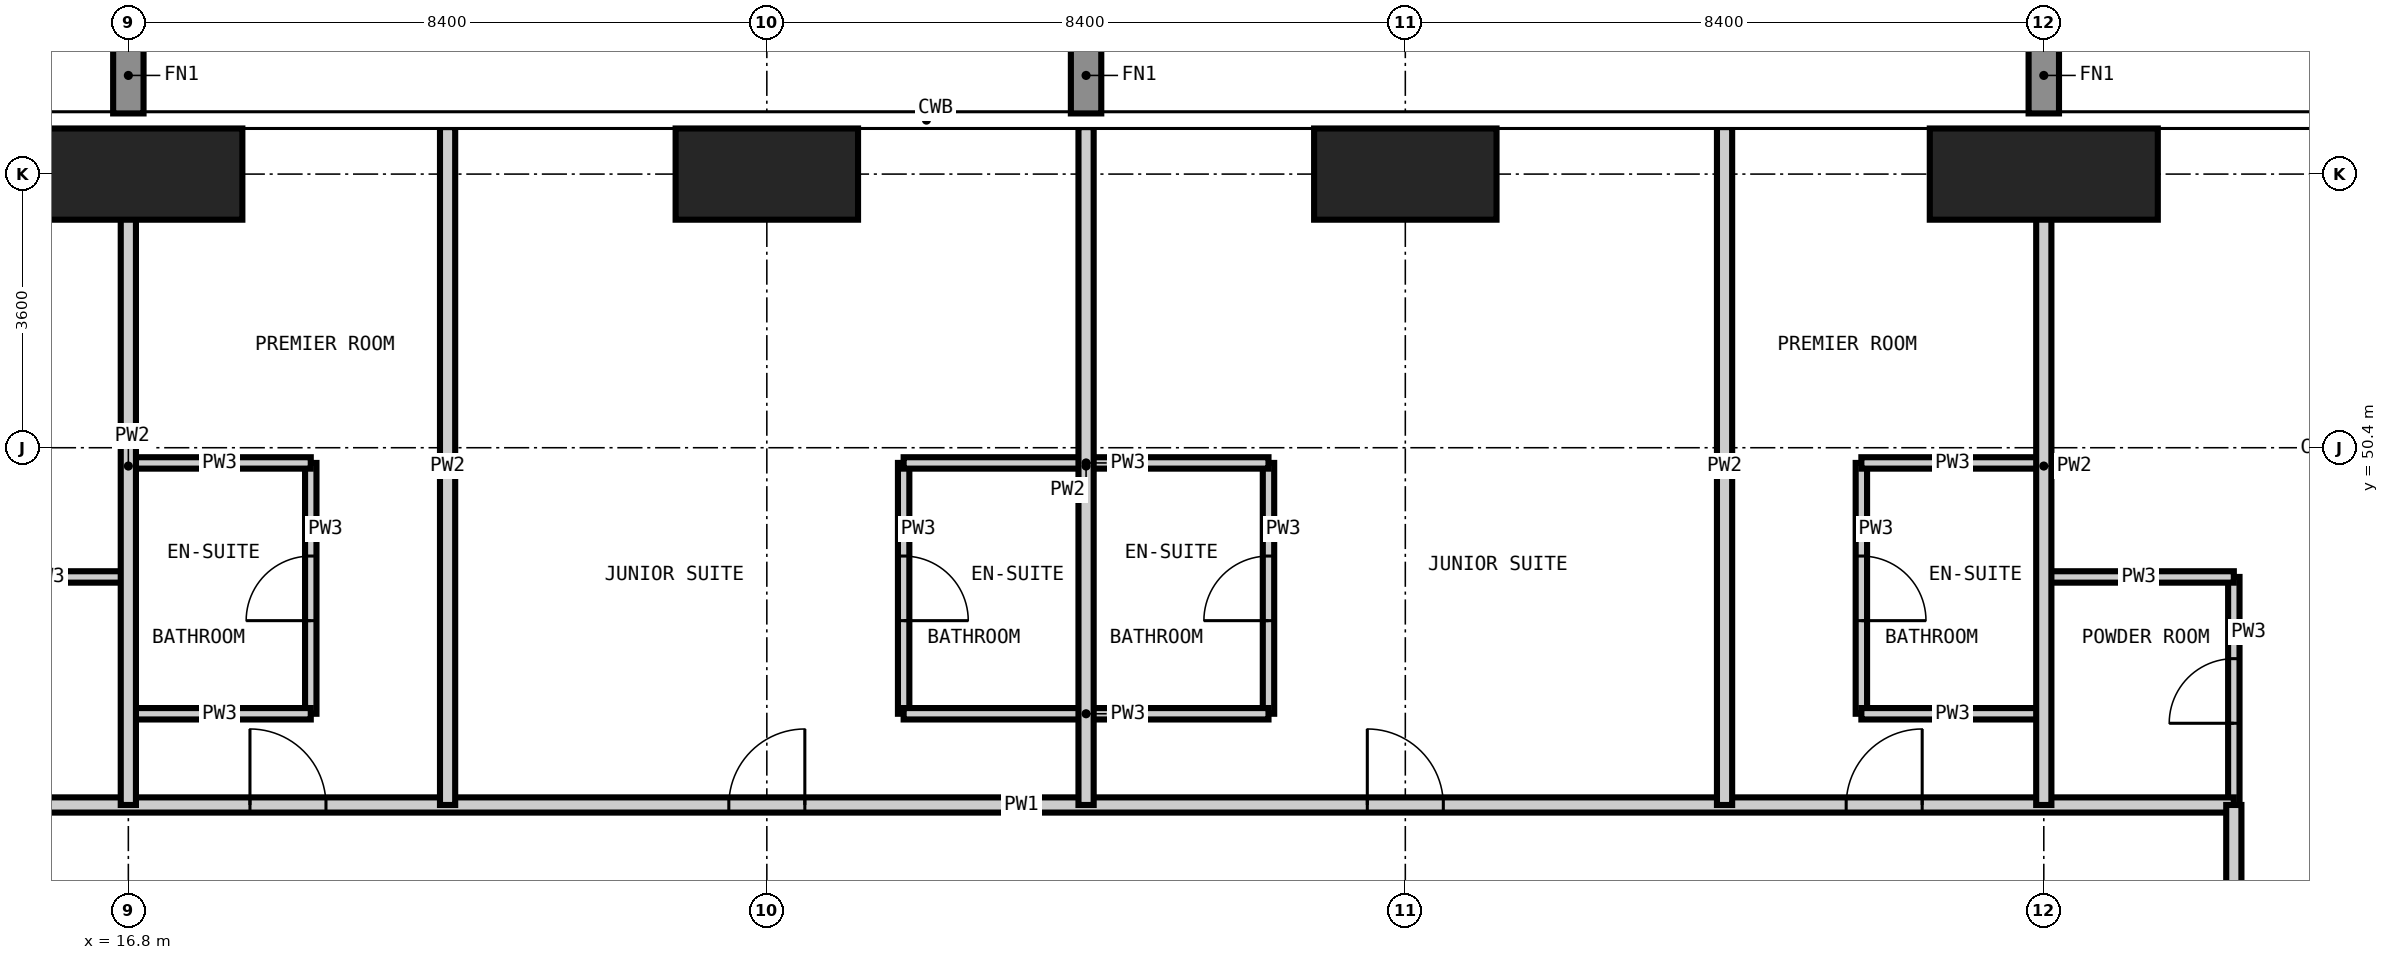
"""IFC4 building model, lengths in metres.
Left out: names, types, materials, properties, quantities, classifications, styles, units other than length and angle.
Written with IfcOpenShell. Run it as: python <this file> out.ifc"""

import sys

from ifc_helpers import new_model, si_unit, direction, frame, frame_2d, origin, origin_2d, place, context, subcontext, project, spatial, rectangle, extrude, element, fill, save


model = new_model("IFC4")
c1 = context("Model", 3, precision=1e-05, world=origin(), true_north=direction((0.0, 1.0)))
c2 = subcontext(c1, "Body", "Model", "MODEL_VIEW")
j1 = project(units=[si_unit("LENGTHUNIT", "METRE"), si_unit("PLANEANGLEUNIT", "RADIAN")], contexts=[c1])
p1 = place(None, origin())
s1 = spatial("IfcSite", under=j1, at=p1, CompositionType="ELEMENT")
p2 = place(p1, origin())
s2 = spatial("IfcBuilding", under=s1, at=p2, CompositionType="ELEMENT")
p3 = place(p2, frame((0.0, 0.0, 97.2)))
s3 = spatial("IfcBuildingStorey", under=s2, at=p3, CompositionType="ELEMENT", Elevation=97.2)
p4 = place(p3, frame((16.8, 54.0, -0.35), z_axis=(0.0, 0.0, 1.0), x_axis=(1.0, 0.0, 0.0)))
e1 = element("IfcColumn", 1, at=p4, inside=s3, PredefinedType="COLUMN", context=c2, shape_type="SweptSolid", body=[
    extrude(rectangle(XDim=3.0, YDim=1.2, at=origin_2d()), origin(), (0.0, 0.0, 1.0), 3.6),
])
for number, where, z_axis, x_axis in (
    (2, (25.2, 54.0, -0.35), (0.0, 0.0, 1.0), (1.0, 0.0, 0.0)),
    (3, (33.6, 54.0, -0.35), (0.0, 0.0, 1.0), (1.0, 0.0, 0.0)),
):
    element("IfcColumn", number, at=place(p3, frame(where, z_axis=z_axis, x_axis=x_axis)), inside=s3, PredefinedType="COLUMN", context=c2, shape_type="SweptSolid", body=[
        extrude(rectangle(XDim=2.4, YDim=1.2, at=origin_2d()), origin(), (0.0, 0.0, 1.0), 3.6),
    ])
p5 = place(p3, frame((42.0, 54.0, -0.35), z_axis=(0.0, 0.0, 1.0), x_axis=(1.0, 0.0, 0.0)))
e4 = element("IfcColumn", 4, at=p5, inside=s3, PredefinedType="COLUMN", context=c2, shape_type="SweptSolid", body=[
    extrude(rectangle(XDim=3.0, YDim=1.2, at=origin_2d()), origin(), (0.0, 0.0, 1.0), 3.6),
])
p6 = place(p3, frame((19.2, 46.9, 0.0), z_axis=(0.0, 0.0, 1.0), x_axis=(0.0, 1.0, 0.0)))
e5 = element("IfcWall", 5, at=p6, inside=s3, PredefinedType="PARTITIONING", context=c2, shape_type="SweptSolid", body=[
    extrude(rectangle(XDim=3.3, YDim=0.15, at=frame_2d((1.65, 0.0))), origin(), (0.0, 0.0, 1.0), 3.25),
])
p7 = place(p6, frame((1.225, 0.0, 0.0)))
e6 = element("IfcOpeningElement", 6, at=p7, cuts=e5, PredefinedType="OPENING", context=c2, shape_type="SweptSolid", body=[
    extrude(rectangle(XDim=0.85, YDim=2.1, at=frame_2d((0.425, 1.05))), frame((0.0, 0.085, 0.0), z_axis=(0.0, -1.0, 0.0), x_axis=(1.0, 0.0, 0.0)), (0.0, 0.0, 1.0), 0.17),
])
p8 = place(p3, frame((27.0, 46.9, 0.0), z_axis=(0.0, 0.0, 1.0), x_axis=(0.0, 1.0, 0.0)))
e7 = element("IfcWall", 7, at=p8, inside=s3, PredefinedType="PARTITIONING", context=c2, shape_type="SweptSolid", body=[
    extrude(rectangle(XDim=3.3, YDim=0.15, at=frame_2d((1.65, 0.0))), origin(), (0.0, 0.0, 1.0), 3.25),
])
p9 = place(p8, frame((1.225, 0.0, 0.0)))
e8 = element("IfcOpeningElement", 8, at=p9, cuts=e7, PredefinedType="OPENING", context=c2, shape_type="SweptSolid", body=[
    extrude(rectangle(XDim=0.85, YDim=2.1, at=frame_2d((0.425, 1.05))), frame((0.0, 0.085, 0.0), z_axis=(0.0, -1.0, 0.0), x_axis=(1.0, 0.0, 0.0)), (0.0, 0.0, 1.0), 0.17),
])
p10 = place(p3, frame((31.8, 46.9, 0.0), z_axis=(0.0, 0.0, 1.0), x_axis=(0.0, 1.0, 0.0)))
e9 = element("IfcWall", 9, at=p10, inside=s3, PredefinedType="PARTITIONING", context=c2, shape_type="SweptSolid", body=[
    extrude(rectangle(XDim=3.3, YDim=0.15, at=frame_2d((1.65, 0.0))), origin(), (0.0, 0.0, 1.0), 3.25),
])
p11 = place(p10, frame((1.225, 0.0, 0.0)))
e10 = element("IfcOpeningElement", 10, at=p11, cuts=e9, PredefinedType="OPENING", context=c2, shape_type="SweptSolid", body=[
    extrude(rectangle(XDim=0.85, YDim=2.1, at=frame_2d((0.425, 1.05))), frame((0.0, 0.085, 0.0), z_axis=(0.0, -1.0, 0.0), x_axis=(1.0, 0.0, 0.0)), (0.0, 0.0, 1.0), 0.17),
])
p12 = place(p3, frame((39.6, 46.9, 0.0), z_axis=(0.0, 0.0, 1.0), x_axis=(0.0, 1.0, 0.0)))
e11 = element("IfcWall", 11, at=p12, inside=s3, PredefinedType="PARTITIONING", context=c2, shape_type="SweptSolid", body=[
    extrude(rectangle(XDim=3.3, YDim=0.15, at=frame_2d((1.65, 0.0))), origin(), (0.0, 0.0, 1.0), 3.25),
])
p13 = place(p12, frame((1.225, 0.0, 0.0)))
e12 = element("IfcOpeningElement", 12, at=p13, cuts=e11, PredefinedType="OPENING", context=c2, shape_type="SweptSolid", body=[
    extrude(rectangle(XDim=0.85, YDim=2.1, at=frame_2d((0.425, 1.05))), frame((0.0, 0.085, 0.0), z_axis=(0.0, -1.0, 0.0), x_axis=(1.0, 0.0, 0.0)), (0.0, 0.0, 1.0), 0.17),
])
p14 = place(p3, frame((44.5, 45.7, 0.0), z_axis=(0.0, 0.0, 1.0), x_axis=(0.0, 1.0, 0.0)))
e13 = element("IfcWall", 13, at=p14, inside=s3, PredefinedType="PARTITIONING", context=c2, shape_type="SweptSolid", body=[
    extrude(rectangle(XDim=3.0, YDim=0.15, at=frame_2d((1.5, 0.0))), origin(), (0.0, 0.0, 1.0), 3.25),
])
p15 = place(p14, frame((1.075, 0.0, 0.0)))
e14 = element("IfcOpeningElement", 14, at=p15, cuts=e13, PredefinedType="OPENING", context=c2, shape_type="SweptSolid", body=[
    extrude(rectangle(XDim=0.85, YDim=2.1, at=frame_2d((0.425, 1.05))), frame((0.0, 0.085, 0.0), z_axis=(0.0, -1.0, 0.0), x_axis=(1.0, 0.0, 0.0)), (0.0, 0.0, 1.0), 0.17),
])
p16 = place(p3, frame((16.8, 46.9, 0.0), z_axis=(0.0, 0.0, 1.0), x_axis=(1.0, 0.0, 0.0)))
e15 = element("IfcWall", 15, at=p16, inside=s3, PredefinedType="PARTITIONING", context=c2, shape_type="SweptSolid", body=[
    extrude(rectangle(XDim=2.4, YDim=0.15, at=frame_2d((1.2, 0.0))), origin(), (0.0, 0.0, 1.0), 3.25),
])
p17 = place(p3, frame((27.0, 46.9, 0.0), z_axis=(0.0, 0.0, 1.0), x_axis=(1.0, 0.0, 0.0)))
e16 = element("IfcWall", 16, at=p17, inside=s3, PredefinedType="PARTITIONING", context=c2, shape_type="SweptSolid", body=[
    extrude(rectangle(XDim=4.8, YDim=0.15, at=frame_2d((2.4, 0.0))), origin(), (0.0, 0.0, 1.0), 3.25),
])
p18 = place(p3, frame((39.6, 46.9, 0.0), z_axis=(0.0, 0.0, 1.0), x_axis=(1.0, 0.0, 0.0)))
e17 = element("IfcWall", 17, at=p18, inside=s3, PredefinedType="PARTITIONING", context=c2, shape_type="SweptSolid", body=[
    extrude(rectangle(XDim=2.4, YDim=0.15, at=frame_2d((1.2, 0.0))), origin(), (0.0, 0.0, 1.0), 3.25),
])
p19 = place(p3, frame((12.6, 48.7, 0.0), z_axis=(0.0, 0.0, 1.0), x_axis=(1.0, 0.0, 0.0)))
e18 = element("IfcWall", 18, at=p19, inside=s3, PredefinedType="PARTITIONING", context=c2, shape_type="SweptSolid", body=[
    extrude(rectangle(XDim=4.2, YDim=0.15, at=frame_2d((2.1, 0.0))), origin(), (0.0, 0.0, 1.0), 3.25),
])
p20 = place(p19, frame((1.675, 0.0, 0.0)))
e19 = element("IfcOpeningElement", 19, at=p20, cuts=e18, PredefinedType="OPENING", context=c2, shape_type="SweptSolid", body=[
    extrude(rectangle(XDim=0.85, YDim=2.1, at=frame_2d((0.425, 1.05))), frame((0.0, 0.085, 0.0), z_axis=(0.0, -1.0, 0.0), x_axis=(1.0, 0.0, 0.0)), (0.0, 0.0, 1.0), 0.17),
])
p21 = place(p3, frame((42.0, 48.7, 0.0), z_axis=(0.0, 0.0, 1.0), x_axis=(1.0, 0.0, 0.0)))
e20 = element("IfcWall", 20, at=p21, inside=s3, PredefinedType="PARTITIONING", context=c2, shape_type="SweptSolid", body=[
    extrude(rectangle(XDim=2.5, YDim=0.15, at=frame_2d((1.25, 0.0))), origin(), (0.0, 0.0, 1.0), 3.25),
])
p22 = place(p3, frame((16.8, 50.2, 0.0), z_axis=(0.0, 0.0, 1.0), x_axis=(1.0, 0.0, 0.0)))
e21 = element("IfcWall", 21, at=p22, inside=s3, PredefinedType="PARTITIONING", context=c2, shape_type="SweptSolid", body=[
    extrude(rectangle(XDim=2.4, YDim=0.15, at=frame_2d((1.2, 0.0))), origin(), (0.0, 0.0, 1.0), 3.25),
])
p23 = place(p3, frame((27.0, 50.2, 0.0), z_axis=(0.0, 0.0, 1.0), x_axis=(1.0, 0.0, 0.0)))
e22 = element("IfcWall", 22, at=p23, inside=s3, PredefinedType="PARTITIONING", context=c2, shape_type="SweptSolid", body=[
    extrude(rectangle(XDim=4.8, YDim=0.15, at=frame_2d((2.4, 0.0))), origin(), (0.0, 0.0, 1.0), 3.25),
])
p24 = place(p3, frame((39.6, 50.2, 0.0), z_axis=(0.0, 0.0, 1.0), x_axis=(1.0, 0.0, 0.0)))
e23 = element("IfcWall", 23, at=p24, inside=s3, PredefinedType="PARTITIONING", context=c2, shape_type="SweptSolid", body=[
    extrude(rectangle(XDim=2.4, YDim=0.15, at=frame_2d((1.2, 0.0))), origin(), (0.0, 0.0, 1.0), 3.25),
])
p25 = place(p3, frame((12.6, 45.7, 0.0), z_axis=(0.0, 0.0, 1.0), x_axis=(1.0, 0.0, 0.0)))
e24 = element("IfcWall", 24, at=p25, inside=s3, PredefinedType="PARTITIONING", context=c2, shape_type="SweptSolid", body=[
    extrude(rectangle(XDim=31.9, YDim=0.2, at=frame_2d((15.95, 0.0))), origin(), (0.0, 0.0, 1.0), 3.25),
])
p26 = place(p25, frame((5.8, 0.0, 0.0)))
e25 = element("IfcOpeningElement", 25, at=p26, cuts=e24, PredefinedType="OPENING", context=c2, shape_type="SweptSolid", body=[
    extrude(rectangle(XDim=1.0, YDim=2.2, at=frame_2d((0.5, 1.1))), frame((0.0, 0.11, 0.0), z_axis=(0.0, -1.0, 0.0), x_axis=(1.0, 0.0, 0.0)), (0.0, 0.0, 1.0), 0.22),
])
p27 = place(p25, frame((12.1, 0.0, 0.0)))
e26 = element("IfcOpeningElement", 26, at=p27, cuts=e24, PredefinedType="OPENING", context=c2, shape_type="SweptSolid", body=[
    extrude(rectangle(XDim=1.0, YDim=2.2, at=frame_2d((0.5, 1.1))), frame((0.0, 0.11, 0.0), z_axis=(0.0, -1.0, 0.0), x_axis=(1.0, 0.0, 0.0)), (0.0, 0.0, 1.0), 0.22),
])
p28 = place(p25, frame((20.5, 0.0, 0.0)))
e27 = element("IfcOpeningElement", 27, at=p28, cuts=e24, PredefinedType="OPENING", context=c2, shape_type="SweptSolid", body=[
    extrude(rectangle(XDim=1.0, YDim=2.2, at=frame_2d((0.5, 1.1))), frame((0.0, 0.11, 0.0), z_axis=(0.0, -1.0, 0.0), x_axis=(1.0, 0.0, 0.0)), (0.0, 0.0, 1.0), 0.22),
])
p29 = place(p25, frame((26.8, 0.0, 0.0)))
e28 = element("IfcOpeningElement", 28, at=p29, cuts=e24, PredefinedType="OPENING", context=c2, shape_type="SweptSolid", body=[
    extrude(rectangle(XDim=1.0, YDim=2.2, at=frame_2d((0.5, 1.1))), frame((0.0, 0.11, 0.0), z_axis=(0.0, -1.0, 0.0), x_axis=(1.0, 0.0, 0.0)), (0.0, 0.0, 1.0), 0.22),
])
p30 = place(p3, frame((44.5, 45.7, 0.0), z_axis=(0.0, 0.0, 1.0), x_axis=(0.0, -1.0, 0.0)))
e29 = element("IfcWall", 29, at=p30, inside=s3, PredefinedType="PARTITIONING", context=c2, shape_type="SweptSolid", body=[
    extrude(rectangle(XDim=32.0, YDim=0.2, at=frame_2d((16.0, 0.0))), origin(), (0.0, 0.0, 1.0), 3.25),
])
p31 = place(p30, frame((26.3, 0.0, 0.0)))
e30 = element("IfcOpeningElement", 30, at=p31, cuts=e29, PredefinedType="OPENING", context=c2, shape_type="SweptSolid", body=[
    extrude(rectangle(XDim=1.0, YDim=2.2, at=frame_2d((0.5, 1.1))), frame((0.0, 0.11, 0.0), z_axis=(0.0, -1.0, 0.0), x_axis=(1.0, 0.0, 0.0)), (0.0, 0.0, 1.0), 0.22),
])
p32 = place(p30, frame((20.0, 0.0, 0.0)))
e31 = element("IfcOpeningElement", 31, at=p32, cuts=e29, PredefinedType="OPENING", context=c2, shape_type="SweptSolid", body=[
    extrude(rectangle(XDim=1.0, YDim=2.2, at=frame_2d((0.5, 1.1))), frame((0.0, 0.11, 0.0), z_axis=(0.0, -1.0, 0.0), x_axis=(1.0, 0.0, 0.0)), (0.0, 0.0, 1.0), 0.22),
])
p33 = place(p30, frame((11.6, 0.0, 0.0)))
e32 = element("IfcOpeningElement", 32, at=p33, cuts=e29, PredefinedType="OPENING", context=c2, shape_type="SweptSolid", body=[
    extrude(rectangle(XDim=1.0, YDim=2.2, at=frame_2d((0.5, 1.1))), frame((0.0, 0.11, 0.0), z_axis=(0.0, -1.0, 0.0), x_axis=(1.0, 0.0, 0.0)), (0.0, 0.0, 1.0), 0.22),
])
p34 = place(p30, frame((5.3, 0.0, 0.0)))
e33 = element("IfcOpeningElement", 33, at=p34, cuts=e29, PredefinedType="OPENING", context=c2, shape_type="SweptSolid", body=[
    extrude(rectangle(XDim=1.0, YDim=2.2, at=frame_2d((0.5, 1.1))), frame((0.0, 0.11, 0.0), z_axis=(0.0, -1.0, 0.0), x_axis=(1.0, 0.0, 0.0)), (0.0, 0.0, 1.0), 0.22),
])
p35 = place(p30, frame((29.95, 0.0, 0.0)))
e34 = element("IfcOpeningElement", 34, at=p35, cuts=e29, PredefinedType="OPENING", context=c2, shape_type="SweptSolid", body=[
    extrude(rectangle(XDim=1.0, YDim=2.2, at=frame_2d((0.5, 1.1))), frame((0.0, 0.11, 0.0), z_axis=(0.0, -1.0, 0.0), x_axis=(1.0, 0.0, 0.0)), (0.0, 0.0, 1.0), 0.22),
])
p36 = place(p30, frame((1.35, 0.0, 0.0)))
e35 = element("IfcOpeningElement", 35, at=p36, cuts=e29, PredefinedType="OPENING", context=c2, shape_type="SweptSolid", body=[
    extrude(rectangle(XDim=1.0, YDim=2.2, at=frame_2d((0.5, 1.1))), frame((0.0, 0.11, 0.0), z_axis=(0.0, -1.0, 0.0), x_axis=(1.0, 0.0, 0.0)), (0.0, 0.0, 1.0), 0.22),
])
for number, where, z_axis, x_axis in (
    (36, (16.8, 45.7, 0.0), (0.0, 0.0, 1.0), (0.0, 1.0, 0.0)),
    (37, (21.0, 45.7, 0.0), (0.0, 0.0, 1.0), (0.0, 1.0, 0.0)),
    (38, (29.4, 45.7, 0.0), (0.0, 0.0, 1.0), (0.0, 1.0, 0.0)),
    (39, (37.8, 45.7, 0.0), (0.0, 0.0, 1.0), (0.0, 1.0, 0.0)),
    (40, (42.0, 45.7, 0.0), (0.0, 0.0, 1.0), (0.0, 1.0, 0.0)),
):
    element("IfcWall", number, at=place(p3, frame(where, z_axis=z_axis, x_axis=x_axis)), inside=s3, PredefinedType="PARTITIONING", context=c2, shape_type="SweptSolid", body=[
        extrude(rectangle(XDim=8.918, YDim=0.2, at=frame_2d((4.459, 0.0))), origin(), (0.0, 0.0, 1.0), 3.25),
    ])
p37 = place(p26, origin())
e41 = element("IfcDoor", 41, at=p37, inside=s3, OperationType="SINGLE_SWING_LEFT", PredefinedType="DOOR", context=c2, shape_type="SweptSolid", body=[
    extrude(rectangle(XDim=1.0, YDim=2.2, at=frame_2d((0.5, 1.1))), frame((0.0, 0.025, 0.0), z_axis=(0.0, -1.0, 0.0), x_axis=(1.0, 0.0, 0.0)), (0.0, 0.0, 1.0), 0.05),
])
fill(e25, e41)
p38 = place(p7, origin())
e42 = element("IfcDoor", 42, at=p38, inside=s3, OperationType="SINGLE_SWING_LEFT", PredefinedType="DOOR", context=c2, shape_type="SweptSolid", body=[
    extrude(rectangle(XDim=0.85, YDim=2.1, at=frame_2d((0.425, 1.05))), frame((0.0, 0.025, 0.0), z_axis=(0.0, -1.0, 0.0), x_axis=(1.0, 0.0, 0.0)), (0.0, 0.0, 1.0), 0.05),
])
fill(e6, e42)
p39 = place(p27, origin())
e43 = element("IfcDoor", 43, at=p39, inside=s3, OperationType="SINGLE_SWING_RIGHT", PredefinedType="DOOR", context=c2, shape_type="SweptSolid", body=[
    extrude(rectangle(XDim=1.0, YDim=2.2, at=frame_2d((0.5, 1.1))), frame((0.0, 0.025, 0.0), z_axis=(0.0, -1.0, 0.0), x_axis=(1.0, 0.0, 0.0)), (0.0, 0.0, 1.0), 0.05),
])
fill(e26, e43)
p40 = place(p9, frame((0.85, 0.0, 0.0), z_axis=(0.0, 0.0, 1.0), x_axis=(-1.0, 0.0, 0.0)))
e44 = element("IfcDoor", 44, at=p40, inside=s3, OperationType="SINGLE_SWING_RIGHT", PredefinedType="DOOR", context=c2, shape_type="SweptSolid", body=[
    extrude(rectangle(XDim=0.85, YDim=2.1, at=frame_2d((0.425, 1.05))), frame((0.0, 0.025, 0.0), z_axis=(0.0, -1.0, 0.0), x_axis=(1.0, 0.0, 0.0)), (0.0, 0.0, 1.0), 0.05),
])
fill(e8, e44)
p41 = place(p28, origin())
e45 = element("IfcDoor", 45, at=p41, inside=s3, OperationType="SINGLE_SWING_LEFT", PredefinedType="DOOR", context=c2, shape_type="SweptSolid", body=[
    extrude(rectangle(XDim=1.0, YDim=2.2, at=frame_2d((0.5, 1.1))), frame((0.0, 0.025, 0.0), z_axis=(0.0, -1.0, 0.0), x_axis=(1.0, 0.0, 0.0)), (0.0, 0.0, 1.0), 0.05),
])
fill(e27, e45)
p42 = place(p11, origin())
e46 = element("IfcDoor", 46, at=p42, inside=s3, OperationType="SINGLE_SWING_LEFT", PredefinedType="DOOR", context=c2, shape_type="SweptSolid", body=[
    extrude(rectangle(XDim=0.85, YDim=2.1, at=frame_2d((0.425, 1.05))), frame((0.0, 0.025, 0.0), z_axis=(0.0, -1.0, 0.0), x_axis=(1.0, 0.0, 0.0)), (0.0, 0.0, 1.0), 0.05),
])
fill(e10, e46)
p43 = place(p29, origin())
e47 = element("IfcDoor", 47, at=p43, inside=s3, OperationType="SINGLE_SWING_RIGHT", PredefinedType="DOOR", context=c2, shape_type="SweptSolid", body=[
    extrude(rectangle(XDim=1.0, YDim=2.2, at=frame_2d((0.5, 1.1))), frame((0.0, 0.025, 0.0), z_axis=(0.0, -1.0, 0.0), x_axis=(1.0, 0.0, 0.0)), (0.0, 0.0, 1.0), 0.05),
])
fill(e28, e47)
p44 = place(p13, frame((0.85, 0.0, 0.0), z_axis=(0.0, 0.0, 1.0), x_axis=(-1.0, 0.0, 0.0)))
e48 = element("IfcDoor", 48, at=p44, inside=s3, OperationType="SINGLE_SWING_RIGHT", PredefinedType="DOOR", context=c2, shape_type="SweptSolid", body=[
    extrude(rectangle(XDim=0.85, YDim=2.1, at=frame_2d((0.425, 1.05))), frame((0.0, 0.025, 0.0), z_axis=(0.0, -1.0, 0.0), x_axis=(1.0, 0.0, 0.0)), (0.0, 0.0, 1.0), 0.05),
])
fill(e12, e48)
p45 = place(p15, origin())
e49 = element("IfcDoor", 49, at=p45, inside=s3, OperationType="SINGLE_SWING_LEFT", PredefinedType="DOOR", context=c2, shape_type="SweptSolid", body=[
    extrude(rectangle(XDim=0.85, YDim=2.1, at=frame_2d((0.425, 1.05))), frame((0.0, 0.025, 0.0), z_axis=(0.0, -1.0, 0.0), x_axis=(1.0, 0.0, 0.0)), (0.0, 0.0, 1.0), 0.05),
])
fill(e14, e49)
save(model, sys.argv[1])
